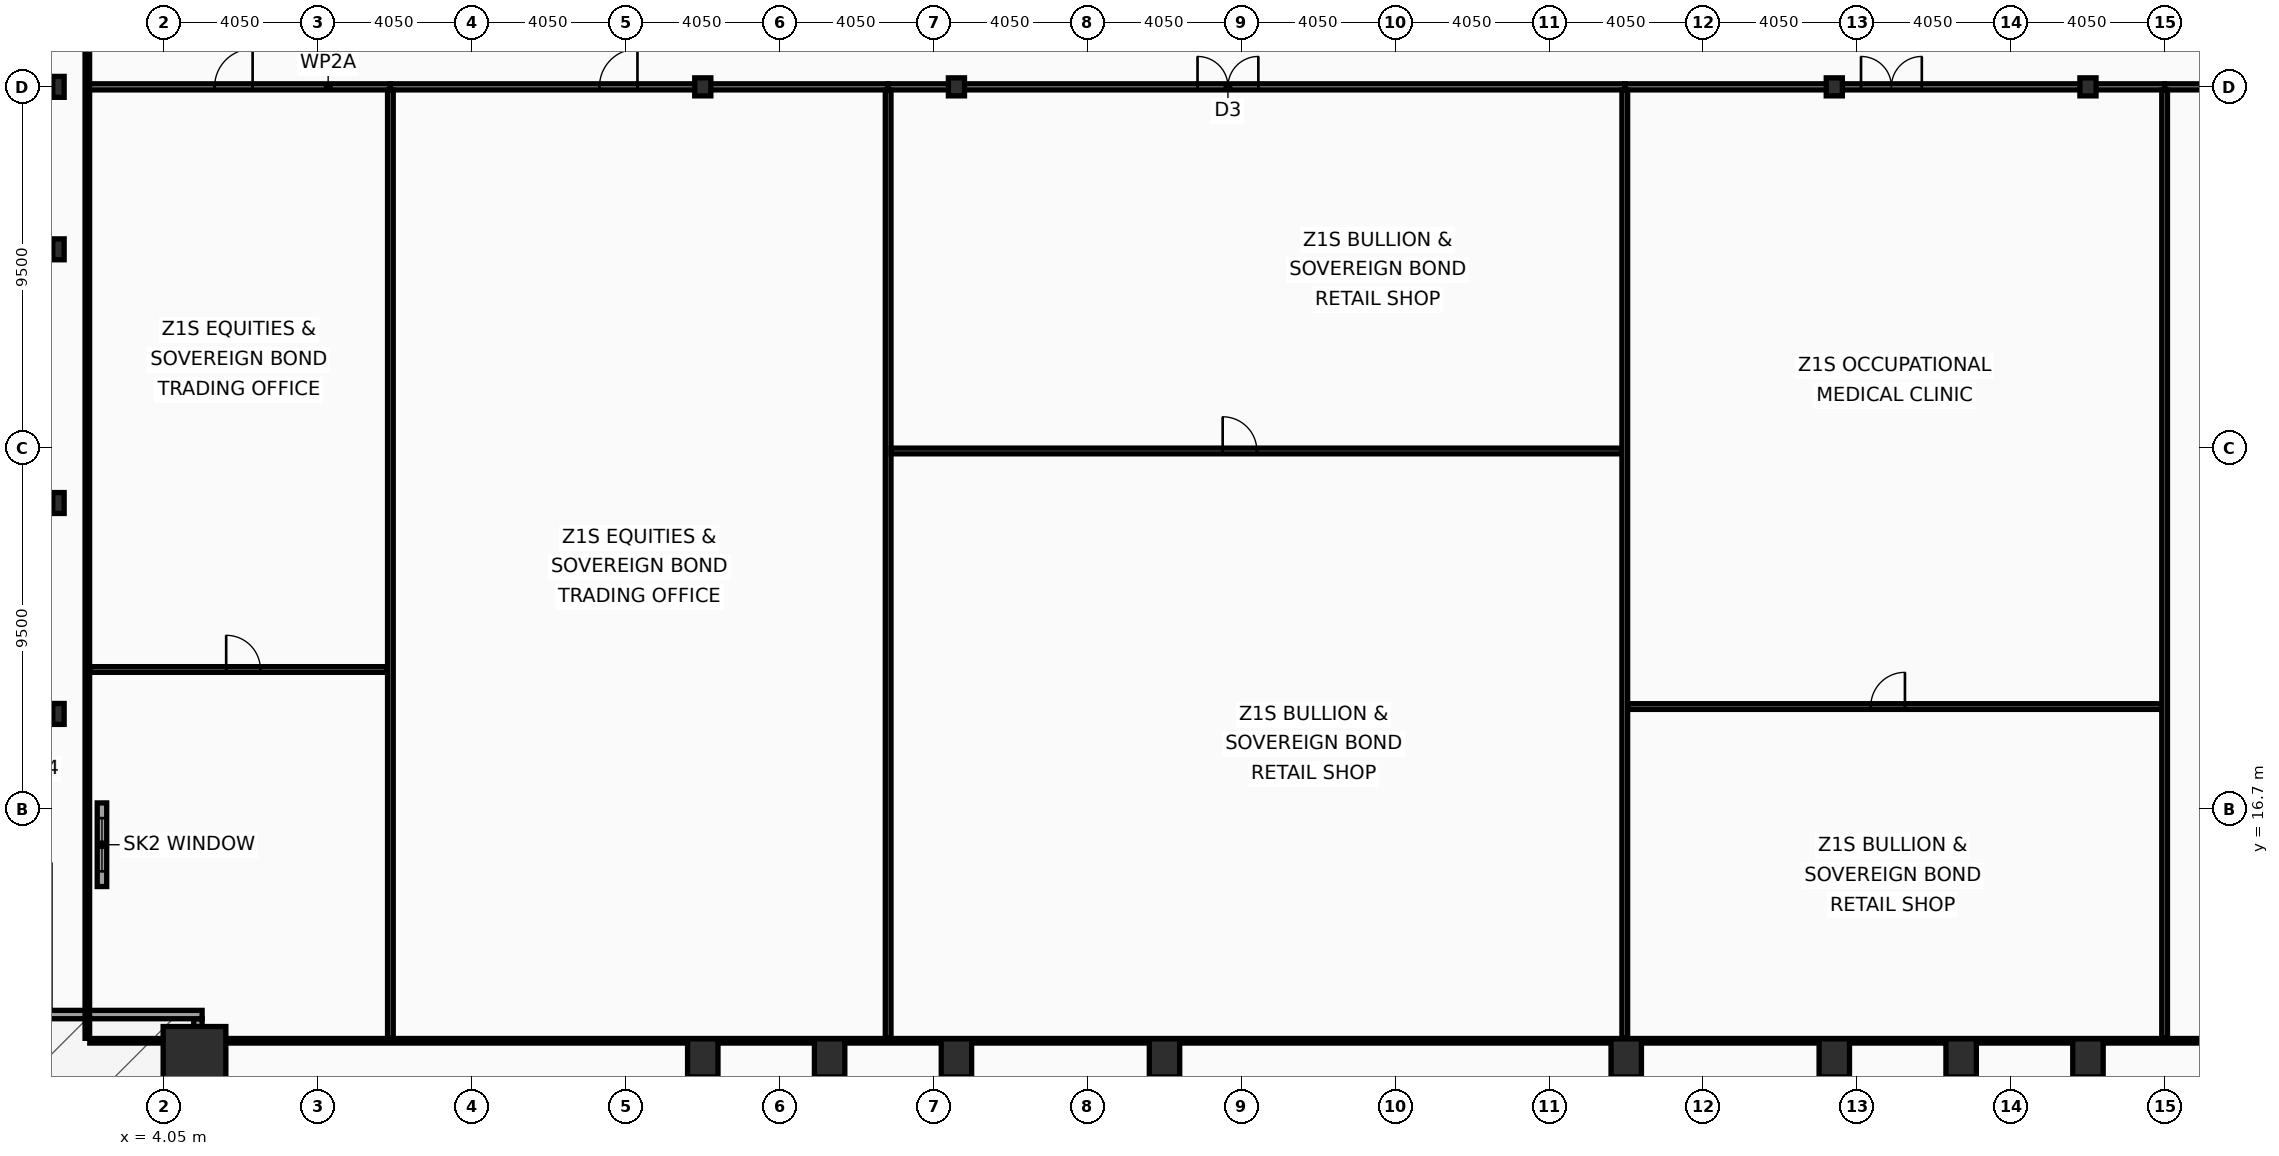
"""IFC4 building model, lengths in metres.
Left out: names, types, materials, properties, quantities, classifications, styles, units other than length and angle.
Written with IfcOpenShell. Run it as: python <this file> out.ifc"""

import sys

from ifc_helpers import new_model, si_unit, direction, frame, frame_2d, origin, origin_2d, place, context, subcontext, project, spatial, rectangle, hollow_rectangle, i_section, extrude, element, fill, save


model = new_model("IFC4")
c1 = context("Model", 3, precision=1e-05, world=origin(), true_north=direction((0.0, 1.0)))
c2 = subcontext(c1, "Body", "Model", "MODEL_VIEW")
j1 = project(units=[si_unit("LENGTHUNIT", "METRE"), si_unit("PLANEANGLEUNIT", "RADIAN")], contexts=[c1])
p1 = place(None, origin())
s1 = spatial("IfcSite", under=j1, at=p1, CompositionType="ELEMENT")
p2 = place(p1, origin())
s2 = spatial("IfcBuilding", under=s1, at=p2, CompositionType="ELEMENT")
p3 = place(p2, frame((0.0, 0.0, 25.8)))
s3 = spatial("IfcBuildingStorey", under=s2, at=p3, CompositionType="ELEMENT", Elevation=25.8)
p4 = place(p3, frame((4.85, 10.15, 0.0), z_axis=(0.0, 0.0, 1.0), x_axis=(1.0, 0.0, 0.0)))
e1 = element("IfcColumn", 1, at=p4, inside=s3, PredefinedType="COLUMN", context=c2, shape_type="SweptSolid", body=[
    extrude(hollow_rectangle(XDim=1.65, YDim=1.65, WallThickness=0.075, at=origin_2d()), origin(), (0.0, 0.0, 1.0), 4.0),
])
for number, where, z_axis, x_axis in (
    (2, (18.225, 10.15, 0.0), (0.0, 0.0, 1.0), (1.0, 0.0, 0.0)),
    (3, (21.562, 10.15, 0.0), (0.0, 0.0, 1.0), (1.0, 0.0, 0.0)),
    (4, (24.9, 10.15, 0.0), (0.0, 0.0, 1.0), (1.0, 0.0, 0.0)),
    (5, (30.375, 10.15, 0.0), (0.0, 0.0, 1.0), (1.0, 0.0, 0.0)),
    (6, (42.525, 10.15, 0.0), (0.0, 0.0, 1.0), (1.0, 0.0, 0.0)),
    (7, (48.0, 10.15, 0.0), (0.0, 0.0, 1.0), (1.0, 0.0, 0.0)),
    (8, (51.337, 10.15, 0.0), (0.0, 0.0, 1.0), (1.0, 0.0, 0.0)),
    (9, (54.675, 10.15, 0.0), (0.0, 0.0, 1.0), (1.0, 0.0, 0.0)),
):
    element("IfcColumn", number, at=place(p3, frame(where, z_axis=z_axis, x_axis=x_axis)), inside=s3, PredefinedType="COLUMN", context=c2, shape_type="SweptSolid", body=[
        extrude(hollow_rectangle(XDim=0.8, YDim=1.0, WallThickness=0.055, at=origin_2d()), origin(), (0.0, 0.0, 1.0), 4.0),
    ])
for number, where, z_axis, x_axis in (
    (10, (1.27, 19.2, 0.0), (0.0, 0.0, 1.0), (1.0, 0.0, 0.0)),
    (11, (1.27, 24.75, 0.0), (0.0, 0.0, 1.0), (1.0, 0.0, 0.0)),
    (12, (1.27, 31.425, 0.0), (0.0, 0.0, 1.0), (1.0, 0.0, 0.0)),
    (13, (1.27, 35.7, 0.0), (0.0, 0.0, 1.0), (1.0, 0.0, 0.0)),
):
    element("IfcColumn", number, at=place(p3, frame(where, z_axis=z_axis, x_axis=x_axis)), inside=s3, PredefinedType="COLUMN", context=c2, shape_type="SweptSolid", body=[
        extrude(i_section(OverallWidth=0.3, OverallDepth=0.55, WebThickness=0.015, FlangeThickness=0.029, at=origin_2d()), origin(), (0.0, 0.0, 1.0), 4.0),
    ])
for number, where, z_axis, x_axis in (
    (14, (18.225, 35.7, 0.0), (0.0, 0.0, 1.0), (1.0, 0.0, 0.0)),
    (15, (24.9, 35.7, 0.0), (0.0, 0.0, 1.0), (1.0, 0.0, 0.0)),
    (16, (48.0, 35.7, 0.0), (0.0, 0.0, 1.0), (1.0, 0.0, 0.0)),
    (17, (54.675, 35.7, 0.0), (0.0, 0.0, 1.0), (1.0, 0.0, 0.0)),
):
    element("IfcColumn", number, at=place(p3, frame(where, z_axis=z_axis, x_axis=x_axis)), inside=s3, PredefinedType="COLUMN", context=c2, shape_type="SweptSolid", body=[
        extrude(i_section(OverallWidth=0.424, OverallDepth=0.474, WebThickness=0.048, FlangeThickness=0.077, at=origin_2d()), origin(), (0.0, 0.0, 1.0), 4.0),
    ])
p5 = place(p3, frame((4.94, 7.27, 0.0), z_axis=(0.0, 0.0, 1.0), x_axis=(0.0, 1.0, 0.0)))
e18 = element("IfcWall", 18, at=p5, inside=s3, PredefinedType="SOLIDWALL", context=c2, shape_type="SweptSolid", body=[
    extrude(rectangle(XDim=3.91, YDim=0.22, at=frame_2d((1.955, 0.0))), origin(), (0.0, 0.0, 1.0), 3.16),
])
p6 = place(p3, frame((5.05, 11.29, 0.0), z_axis=(0.0, 0.0, 1.0), x_axis=(-1.0, 0.0, 0.0)))
e19 = element("IfcWall", 19, at=p6, inside=s3, PredefinedType="SOLIDWALL", context=c2, shape_type="SweptSolid", body=[
    extrude(rectangle(XDim=4.22, YDim=0.22, at=frame_2d((2.11, 0.0))), origin(), (0.0, 0.0, 1.0), 3.16),
])
p7 = place(p3, frame((2.415, 14.658, 0.0), z_axis=(0.0, 0.0, 1.0), x_axis=(0.0, 1.0, 0.0)))
e20 = element("IfcWall", 20, at=p7, inside=s3, PredefinedType="PARAPET", context=c2, shape_type="SweptSolid", body=[
    extrude(rectangle(XDim=2.2, YDim=0.25, at=frame_2d((1.1, 0.0))), origin(), (0.0, 0.0, 1.0), 0.88),
])
p8 = place(p7, frame((0.4, 0.0, 0.16)))
e21 = element("IfcOpeningElement", 21, at=p8, cuts=e20, PredefinedType="OPENING", context=c2, shape_type="SweptSolid", body=[
    extrude(rectangle(XDim=1.4, YDim=0.5, at=frame_2d((0.7, 0.25))), frame((0.0, 0.135, 0.0), z_axis=(0.0, -1.0, 0.0), x_axis=(1.0, 0.0, 0.0)), (0.0, 0.0, 1.0), 0.27),
])
p9 = place(p3, frame((2.03, 35.7, 0.0), z_axis=(0.0, 0.0, 1.0), x_axis=(1.0, 0.0, 0.0)))
e22 = element("IfcWall", 22, at=p9, inside=s3, PredefinedType="PARTITIONING", context=c2, shape_type="SweptSolid", body=[
    extrude(rectangle(XDim=7.975, YDim=0.16, at=frame_2d((3.987, 0.0))), origin(), (0.0, 0.0, 1.0), 3.01),
])
p10 = place(p9, frame((3.35, 0.0, 0.0)))
e23 = element("IfcOpeningElement", 23, at=p10, cuts=e22, PredefinedType="OPENING", context=c2, shape_type="SweptSolid", body=[
    extrude(rectangle(XDim=1.0, YDim=2.05, at=frame_2d((0.5, 1.025))), frame((0.0, 0.09, 0.0), z_axis=(0.0, -1.0, 0.0), x_axis=(1.0, 0.0, 0.0)), (0.0, 0.0, 1.0), 0.18),
])
p11 = place(p3, frame((2.095, 20.369, 0.0), z_axis=(0.0, 0.0, 1.0), x_axis=(1.0, 0.0, 0.0)))
e24 = element("IfcWall", 24, at=p11, inside=s3, PredefinedType="PARTITIONING", context=c2, shape_type="SweptSolid", body=[
    extrude(rectangle(XDim=7.83, YDim=0.15, at=frame_2d((3.915, 0.0))), origin(), (0.0, 0.0, 1.0), 3.82),
])
p12 = place(p11, frame((3.589, 0.0, 0.0)))
e25 = element("IfcOpeningElement", 25, at=p12, cuts=e24, PredefinedType="OPENING", context=c2, shape_type="SweptSolid", body=[
    extrude(rectangle(XDim=0.9, YDim=2.05, at=frame_2d((0.45, 1.025))), frame((0.0, 0.085, 0.0), z_axis=(0.0, -1.0, 0.0), x_axis=(1.0, 0.0, 0.0)), (0.0, 0.0, 1.0), 0.17),
])
p13 = place(p3, frame((10.005, 35.7, 0.0), z_axis=(0.0, 0.0, 1.0), x_axis=(1.0, 0.0, 0.0)))
e26 = element("IfcWall", 26, at=p13, inside=s3, PredefinedType="PARTITIONING", context=c2, shape_type="SweptSolid", body=[
    extrude(rectangle(XDim=13.098, YDim=0.16, at=frame_2d((6.549, 0.0))), origin(), (0.0, 0.0, 1.0), 3.01),
])
p14 = place(p13, frame((5.501, 0.0, 0.0)))
e27 = element("IfcOpeningElement", 27, at=p14, cuts=e26, PredefinedType="OPENING", context=c2, shape_type="SweptSolid", body=[
    extrude(rectangle(XDim=1.0, YDim=2.05, at=frame_2d((0.5, 1.025))), frame((0.0, 0.09, 0.0), z_axis=(0.0, -1.0, 0.0), x_axis=(1.0, 0.0, 0.0)), (0.0, 0.0, 1.0), 0.18),
])
p15 = place(p3, frame((10.005, 10.665, 0.0), z_axis=(0.0, 0.0, 1.0), x_axis=(0.0, 1.0, 0.0)))
e28 = element("IfcWall", 28, at=p15, inside=s3, PredefinedType="PARTITIONING", context=c2, shape_type="SweptSolid", body=[
    extrude(rectangle(XDim=24.95, YDim=0.15, at=frame_2d((12.475, 0.0))), origin(), (0.0, 0.0, 1.0), 3.01),
])
p16 = place(p3, frame((23.103, 35.7, 0.0), z_axis=(0.0, 0.0, 1.0), x_axis=(1.0, 0.0, 0.0)))
e29 = element("IfcWall", 29, at=p16, inside=s3, PredefinedType="PARTITIONING", context=c2, shape_type="SweptSolid", body=[
    extrude(rectangle(XDim=19.384, YDim=0.16, at=frame_2d((9.692, 0.0))), origin(), (0.0, 0.0, 1.0), 3.01),
])
p17 = place(p16, frame((8.141, 0.0, 0.0)))
e30 = element("IfcOpeningElement", 30, at=p17, cuts=e29, PredefinedType="OPENING", context=c2, shape_type="SweptSolid", body=[
    extrude(rectangle(XDim=1.6, YDim=2.15, at=frame_2d((0.8, 1.075))), frame((0.0, 0.09, 0.0), z_axis=(0.0, -1.0, 0.0), x_axis=(1.0, 0.0, 0.0)), (0.0, 0.0, 1.0), 0.18),
])
p18 = place(p3, frame((23.103, 10.665, 0.0), z_axis=(0.0, 0.0, 1.0), x_axis=(0.0, 1.0, 0.0)))
e31 = element("IfcWall", 31, at=p18, inside=s3, PredefinedType="PARTITIONING", context=c2, shape_type="SweptSolid", body=[
    extrude(rectangle(XDim=24.95, YDim=0.15, at=frame_2d((12.475, 0.0))), origin(), (0.0, 0.0, 1.0), 3.21),
])
p19 = place(p3, frame((23.183, 26.119, 0.0), z_axis=(0.0, 0.0, 1.0), x_axis=(1.0, 0.0, 0.0)))
e32 = element("IfcWall", 32, at=p19, inside=s3, PredefinedType="PARTITIONING", context=c2, shape_type="SweptSolid", body=[
    extrude(rectangle(XDim=19.224, YDim=0.15, at=frame_2d((9.612, 0.0))), origin(), (0.0, 0.0, 1.0), 3.01),
])
p20 = place(p19, frame((8.723, 0.0, 0.0)))
e33 = element("IfcOpeningElement", 33, at=p20, cuts=e32, PredefinedType="OPENING", context=c2, shape_type="SweptSolid", body=[
    extrude(rectangle(XDim=0.9, YDim=2.05, at=frame_2d((0.45, 1.025))), frame((0.0, 0.085, 0.0), z_axis=(0.0, -1.0, 0.0), x_axis=(1.0, 0.0, 0.0)), (0.0, 0.0, 1.0), 0.17),
])
p21 = place(p3, frame((42.487, 35.7, 0.0), z_axis=(0.0, 0.0, 1.0), x_axis=(1.0, 0.0, 0.0)))
e34 = element("IfcWall", 34, at=p21, inside=s3, PredefinedType="PARTITIONING", context=c2, shape_type="SweptSolid", body=[
    extrude(rectangle(XDim=14.205, YDim=0.16, at=frame_2d((7.103, 0.0))), origin(), (0.0, 0.0, 1.0), 3.01),
])
p22 = place(p21, frame((6.216, 0.0, 0.0)))
e35 = element("IfcOpeningElement", 35, at=p22, cuts=e34, PredefinedType="OPENING", context=c2, shape_type="SweptSolid", body=[
    extrude(rectangle(XDim=1.6, YDim=2.15, at=frame_2d((0.8, 1.075))), frame((0.0, 0.09, 0.0), z_axis=(0.0, -1.0, 0.0), x_axis=(1.0, 0.0, 0.0)), (0.0, 0.0, 1.0), 0.18),
])
p23 = place(p3, frame((42.487, 10.665, 0.0), z_axis=(0.0, 0.0, 1.0), x_axis=(0.0, 1.0, 0.0)))
e36 = element("IfcWall", 36, at=p23, inside=s3, PredefinedType="PARTITIONING", context=c2, shape_type="SweptSolid", body=[
    extrude(rectangle(XDim=24.95, YDim=0.15, at=frame_2d((12.475, 0.0))), origin(), (0.0, 0.0, 1.0), 3.01),
])
p24 = place(p3, frame((42.567, 19.395, 0.0), z_axis=(0.0, 0.0, 1.0), x_axis=(1.0, 0.0, 0.0)))
e37 = element("IfcWall", 37, at=p24, inside=s3, PredefinedType="PARTITIONING", context=c2, shape_type="SweptSolid", body=[
    extrude(rectangle(XDim=14.046, YDim=0.15, at=frame_2d((7.023, 0.0))), origin(), (0.0, 0.0, 1.0), 3.01),
])
p25 = place(p24, frame((6.393, 0.0, 0.0)))
e38 = element("IfcOpeningElement", 38, at=p25, cuts=e37, PredefinedType="OPENING", context=c2, shape_type="SweptSolid", body=[
    extrude(rectangle(XDim=0.9, YDim=2.05, at=frame_2d((0.45, 1.025))), frame((0.0, 0.085, 0.0), z_axis=(0.0, -1.0, 0.0), x_axis=(1.0, 0.0, 0.0)), (0.0, 0.0, 1.0), 0.17),
])
p26 = place(p3, frame((56.692, 35.7, 0.0), z_axis=(0.0, 0.0, 1.0), x_axis=(1.0, 0.0, 0.0)))
e39 = element("IfcWall", 39, at=p26, inside=s3, PredefinedType="PARTITIONING", context=c2, shape_type="SweptSolid", body=[
    extrude(rectangle(XDim=14.178, YDim=0.16, at=frame_2d((7.089, 0.0))), origin(), (0.0, 0.0, 1.0), 3.01),
])
p27 = place(p26, frame((5.955, 0.0, 0.0)))
e40 = element("IfcOpeningElement", 40, at=p27, cuts=e39, PredefinedType="OPENING", context=c2, shape_type="SweptSolid", body=[
    extrude(rectangle(XDim=1.6, YDim=2.15, at=frame_2d((0.8, 1.075))), frame((0.0, 0.09, 0.0), z_axis=(0.0, -1.0, 0.0), x_axis=(1.0, 0.0, 0.0)), (0.0, 0.0, 1.0), 0.18),
])
p28 = place(p3, frame((56.692, 10.665, 0.0), z_axis=(0.0, 0.0, 1.0), x_axis=(0.0, 1.0, 0.0)))
e41 = element("IfcWall", 41, at=p28, inside=s3, PredefinedType="PARTITIONING", context=c2, shape_type="SweptSolid", body=[
    extrude(rectangle(XDim=24.95, YDim=0.15, at=frame_2d((12.475, 0.0))), origin(), (0.0, 0.0, 1.0), 3.01),
])
p29 = place(p3, frame((2.03, 10.665, 0.0), z_axis=(0.0, 0.0, 1.0), x_axis=(0.0, 1.0, 0.0)))
e42 = element("IfcWall", 42, at=p29, inside=s3, PredefinedType="PARTITIONING", context=c2, shape_type="SweptSolid", body=[
    extrude(rectangle(XDim=42.11, YDim=0.12, at=frame_2d((21.055, 0.0))), origin(), (0.0, 0.0, 1.0), 3.01),
])
p30 = place(p3, frame((2.095, 10.6, 0.0), z_axis=(0.0, 0.0, 1.0), x_axis=(1.0, 0.0, 0.0)))
e43 = element("IfcWall", 43, at=p30, inside=s3, PredefinedType="PARTITIONING", context=c2, shape_type="SweptSolid", body=[
    extrude(rectangle(XDim=68.71, YDim=0.12, at=frame_2d((34.355, 0.0))), origin(), (0.0, 0.0, 1.0), 3.01),
])
p31 = place(p8, origin())
e44 = element("IfcWindow", 44, at=p31, inside=s3, PartitioningType="SINGLE_PANEL", PredefinedType="SKYLIGHT", context=c2, shape_type="SweptSolid", body=[
    extrude(rectangle(XDim=1.4, YDim=0.5, at=frame_2d((0.7, 0.25))), frame((0.0, 0.03, 0.0), z_axis=(0.0, -1.0, 0.0), x_axis=(1.0, 0.0, 0.0)), (0.0, 0.0, 1.0), 0.06),
])
fill(e21, e44)
p32 = place(p10, origin())
e45 = element("IfcDoor", 45, at=p32, inside=s3, OperationType="SINGLE_SWING_RIGHT", PredefinedType="DOOR", context=c2, shape_type="SweptSolid", body=[
    extrude(rectangle(XDim=1.0, YDim=2.05, at=frame_2d((0.5, 1.025))), frame((0.0, 0.025, 0.0), z_axis=(0.0, -1.0, 0.0), x_axis=(1.0, 0.0, 0.0)), (0.0, 0.0, 1.0), 0.05),
])
fill(e23, e45)
p33 = place(p12, origin())
e46 = element("IfcDoor", 46, at=p33, inside=s3, OperationType="SINGLE_SWING_LEFT", PredefinedType="DOOR", context=c2, shape_type="SweptSolid", body=[
    extrude(rectangle(XDim=0.9, YDim=2.05, at=frame_2d((0.45, 1.025))), frame((0.0, 0.025, 0.0), z_axis=(0.0, -1.0, 0.0), x_axis=(1.0, 0.0, 0.0)), (0.0, 0.0, 1.0), 0.05),
])
fill(e25, e46)
p34 = place(p14, origin())
e47 = element("IfcDoor", 47, at=p34, inside=s3, OperationType="SINGLE_SWING_RIGHT", PredefinedType="DOOR", context=c2, shape_type="SweptSolid", body=[
    extrude(rectangle(XDim=1.0, YDim=2.05, at=frame_2d((0.5, 1.025))), frame((0.0, 0.025, 0.0), z_axis=(0.0, -1.0, 0.0), x_axis=(1.0, 0.0, 0.0)), (0.0, 0.0, 1.0), 0.05),
])
fill(e27, e47)
p35 = place(p17, origin())
e48 = element("IfcDoor", 48, at=p35, inside=s3, OperationType="DOUBLE_DOOR_SINGLE_SWING", PredefinedType="DOOR", context=c2, shape_type="SweptSolid", body=[
    extrude(rectangle(XDim=1.6, YDim=2.15, at=frame_2d((0.8, 1.075))), frame((0.0, 0.025, 0.0), z_axis=(0.0, -1.0, 0.0), x_axis=(1.0, 0.0, 0.0)), (0.0, 0.0, 1.0), 0.05),
])
fill(e30, e48)
p36 = place(p20, origin())
e49 = element("IfcDoor", 49, at=p36, inside=s3, OperationType="SINGLE_SWING_LEFT", PredefinedType="DOOR", context=c2, shape_type="SweptSolid", body=[
    extrude(rectangle(XDim=0.9, YDim=2.05, at=frame_2d((0.45, 1.025))), frame((0.0, 0.025, 0.0), z_axis=(0.0, -1.0, 0.0), x_axis=(1.0, 0.0, 0.0)), (0.0, 0.0, 1.0), 0.05),
])
fill(e33, e49)
p37 = place(p22, origin())
e50 = element("IfcDoor", 50, at=p37, inside=s3, OperationType="DOUBLE_DOOR_SINGLE_SWING", PredefinedType="DOOR", context=c2, shape_type="SweptSolid", body=[
    extrude(rectangle(XDim=1.6, YDim=2.15, at=frame_2d((0.8, 1.075))), frame((0.0, 0.025, 0.0), z_axis=(0.0, -1.0, 0.0), x_axis=(1.0, 0.0, 0.0)), (0.0, 0.0, 1.0), 0.05),
])
fill(e35, e50)
p38 = place(p25, origin())
e51 = element("IfcDoor", 51, at=p38, inside=s3, OperationType="SINGLE_SWING_RIGHT", PredefinedType="DOOR", context=c2, shape_type="SweptSolid", body=[
    extrude(rectangle(XDim=0.9, YDim=2.05, at=frame_2d((0.45, 1.025))), frame((0.0, 0.025, 0.0), z_axis=(0.0, -1.0, 0.0), x_axis=(1.0, 0.0, 0.0)), (0.0, 0.0, 1.0), 0.05),
])
fill(e38, e51)
save(model, sys.argv[1])
